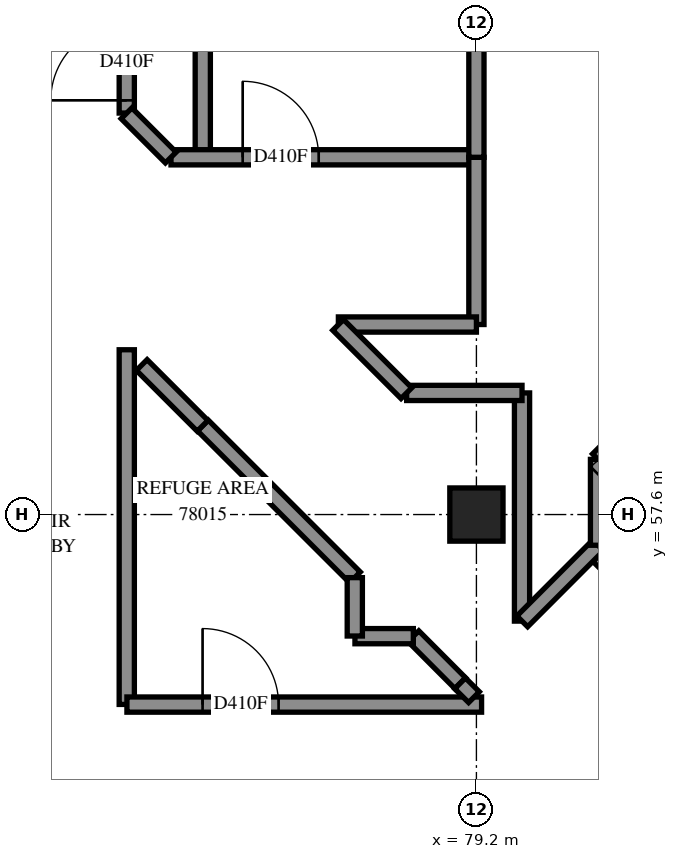
"""IFC4 building model, lengths in metres.
Left out: names, types, materials, properties, quantities, classifications, styles, units other than length and angle.
Written with IfcOpenShell. Run it as: python <this file> out.ifc"""

import sys

from ifc_helpers import new_model, si_unit, direction, frame, frame_2d, origin, origin_2d, place, context, subcontext, project, spatial, rectangle, extrude, element, fill, save


model = new_model("IFC4")
c1 = context("Model", 3, precision=1e-05, world=origin(), true_north=direction((0.0, 1.0)))
c2 = subcontext(c1, "Body", "Model", "MODEL_VIEW")
j1 = project(units=[si_unit("LENGTHUNIT", "METRE"), si_unit("PLANEANGLEUNIT", "RADIAN")], contexts=[c1])
p1 = place(None, origin())
s1 = spatial("IfcSite", under=j1, at=p1, CompositionType="ELEMENT")
p2 = place(p1, origin())
s2 = spatial("IfcBuilding", under=s1, at=p2, CompositionType="ELEMENT")
p3 = place(p2, frame((0.0, 0.0, 284.6)))
s3 = spatial("IfcBuildingStorey", under=s2, at=p3, CompositionType="ELEMENT", Elevation=284.6)
p4 = place(p3, frame((79.2, 57.6, 0.0), z_axis=(0.0, 0.0, 1.0), x_axis=(1.0, 0.0, 0.0)))
e1 = element("IfcColumn", 1, at=p4, inside=s3, PredefinedType="COLUMN", context=c2, shape_type="SweptSolid", body=[
    extrude(rectangle(XDim=0.7, YDim=0.7, at=origin_2d()), origin(), (0.0, 0.0, 1.0), 5.7),
])
p5 = place(p3, frame((76.513, 49.231, -0.3), z_axis=(0.0, 0.0, 1.0), x_axis=(0.7071067812, 0.7071067812, 0.0)))
e2 = element("IfcWall", 2, at=p5, inside=s3, PredefinedType="SHEAR", context=c2, shape_type="SweptSolid", body=[
    extrude(rectangle(XDim=14.4, YDim=0.4, at=frame_2d((7.2, 0.0))), origin(), (0.0, 0.0, 1.0), 5.3),
])
p6 = place(p5, frame((4.55, 0.0, 0.3)))
e3 = element("IfcOpeningElement", 3, at=p6, cuts=e2, PredefinedType="OPENING", context=c2, shape_type="SweptSolid", body=[
    extrude(rectangle(XDim=1.1, YDim=2.1, at=frame_2d((0.55, 1.05))), frame((0.0, 0.21, 0.0), z_axis=(0.0, -1.0, 0.0), x_axis=(1.0, 0.0, 0.0)), (0.0, 0.0, 1.0), 0.42),
])
p7 = place(p5, frame((11.35, 0.0, 0.3)))
e4 = element("IfcOpeningElement", 4, at=p7, cuts=e2, PredefinedType="OPENING", context=c2, shape_type="SweptSolid", body=[
    extrude(rectangle(XDim=1.1, YDim=2.1, at=frame_2d((0.55, 1.05))), frame((0.0, 0.21, 0.0), z_axis=(0.0, -1.0, 0.0), x_axis=(1.0, 0.0, 0.0)), (0.0, 0.0, 1.0), 0.42),
])
p8 = place(p3, frame((75.6, 62.3, 0.0), z_axis=(0.0, 0.0, 1.0), x_axis=(0.0, 1.0, 0.0)))
e5 = element("IfcWall", 5, at=p8, inside=s3, PredefinedType="PARTITIONING", context=c2, shape_type="SweptSolid", body=[
    extrude(rectangle(XDim=10.7, YDim=0.2, at=frame_2d((5.35, 0.0))), origin(), (0.0, 0.0, 1.0), 5.7),
])
p9 = place(p3, frame((80.799, 58.327, 0.0), z_axis=(0.0, 0.0, 1.0), x_axis=(0.7071067812, 0.7071067812, 0.0)))
e6 = element("IfcWall", 6, at=p9, inside=s3, PredefinedType="PARTITIONING", context=c2, shape_type="SweptSolid", body=[
    extrude(rectangle(XDim=9.608, YDim=0.2, at=frame_2d((4.804, 0.0))), origin(), (0.0, 0.0, 1.0), 5.7),
])
p10 = place(p3, frame((80.804, 56.912, 0.0), z_axis=(0.0, 0.0, 1.0), x_axis=(0.7069896038, 0.7072239391, 0.0)))
e7 = element("IfcWall", 7, at=p10, inside=s3, PredefinedType="PARTITIONING", context=c2, shape_type="SweptSolid", body=[
    extrude(rectangle(XDim=8.535, YDim=0.2, at=frame_2d((4.267, 0.0))), origin(), (0.0, 0.0, 1.0), 5.7),
])
p11 = place(p10, frame((0.859, 0.0, 0.0)))
e8 = element("IfcOpeningElement", 8, at=p11, cuts=e7, PredefinedType="OPENING", context=c2, shape_type="SweptSolid", body=[
    extrude(rectangle(XDim=1.0, YDim=2.1, at=frame_2d((0.5, 1.05))), frame((0.0, 0.11, 0.0), z_axis=(0.0, -1.0, 0.0), x_axis=(1.0, 0.0, 0.0)), (0.0, 0.0, 1.0), 0.22),
])
p12 = place(p3, frame((74.6, 55.102, 0.0), z_axis=(0.0, 0.0, 1.0), x_axis=(0.0, 1.0, 0.0)))
e9 = element("IfcWall", 9, at=p12, inside=s3, PredefinedType="PARTITIONING", context=c2, shape_type="SweptSolid", body=[
    extrude(rectangle(XDim=4.666, YDim=0.2, at=frame_2d((2.333, 0.0))), origin(), (0.0, 0.0, 1.0), 5.7),
])
p13 = place(p3, frame((74.602, 55.1, 0.0), z_axis=(0.0, 0.0, 1.0), x_axis=(1.0, 0.0, 0.0)))
e10 = element("IfcWall", 10, at=p13, inside=s3, PredefinedType="PARTITIONING", context=c2, shape_type="SweptSolid", body=[
    extrude(rectangle(XDim=4.666, YDim=0.2, at=frame_2d((2.333, 0.0))), origin(), (0.0, 0.0, 1.0), 5.7),
])
p14 = place(p13, frame((0.995, 0.0, 0.0)))
e11 = element("IfcOpeningElement", 11, at=p14, cuts=e10, PredefinedType="OPENING", context=c2, shape_type="SweptSolid", body=[
    extrude(rectangle(XDim=1.0, YDim=2.1, at=frame_2d((0.5, 1.05))), frame((0.0, 0.11, 0.0), z_axis=(0.0, -1.0, 0.0), x_axis=(1.0, 0.0, 0.0)), (0.0, 0.0, 1.0), 0.22),
])
p15 = place(p3, frame((74.6, 62.882, 0.0), z_axis=(0.0, 0.0, 1.0), x_axis=(0.0, 1.0, 0.0)))
e12 = element("IfcWall", 12, at=p15, inside=s3, PredefinedType="PARTITIONING", context=c2, shape_type="SweptSolid", body=[
    extrude(rectangle(XDim=4.518, YDim=0.2, at=frame_2d((2.259, 0.0))), origin(), (0.0, 0.0, 1.0), 5.7),
])
p16 = place(p15, frame((0.167, 0.0, 0.0)))
e13 = element("IfcOpeningElement", 13, at=p16, cuts=e12, PredefinedType="OPENING", context=c2, shape_type="SweptSolid", body=[
    extrude(rectangle(XDim=1.0, YDim=2.1, at=frame_2d((0.5, 1.05))), frame((0.0, 0.11, 0.0), z_axis=(0.0, -1.0, 0.0), x_axis=(1.0, 0.0, 0.0)), (0.0, 0.0, 1.0), 0.22),
])
p17 = place(p3, frame((75.182, 62.3, 0.0), z_axis=(0.0, 0.0, 1.0), x_axis=(1.0, 0.0, 0.0)))
e14 = element("IfcWall", 14, at=p17, inside=s3, PredefinedType="PARTITIONING", context=c2, shape_type="SweptSolid", body=[
    extrude(rectangle(XDim=4.018, YDim=0.2, at=frame_2d((2.009, 0.0))), origin(), (0.0, 0.0, 1.0), 5.7),
])
p18 = place(p17, frame((0.943, 0.0, 0.0)))
e15 = element("IfcOpeningElement", 15, at=p18, cuts=e14, PredefinedType="OPENING", context=c2, shape_type="SweptSolid", body=[
    extrude(rectangle(XDim=1.0, YDim=2.1, at=frame_2d((0.5, 1.05))), frame((0.0, 0.11, 0.0), z_axis=(0.0, -1.0, 0.0), x_axis=(1.0, 0.0, 0.0)), (0.0, 0.0, 1.0), 0.22),
])
p19 = place(p3, frame((79.8, 56.198, 0.0), z_axis=(0.0, 0.0, 1.0), x_axis=(0.0, 1.0, 0.0)))
e16 = element("IfcWall", 16, at=p19, inside=s3, PredefinedType="PARTITIONING", context=c2, shape_type="SweptSolid", body=[
    extrude(rectangle(XDim=3.002, YDim=0.2, at=frame_2d((1.501, 0.0))), origin(), (0.0, 0.0, 1.0), 5.7),
])
p20 = place(p3, frame((75.601, 58.771, 0.0), z_axis=(0.0, 0.0, 1.0), x_axis=(0.7074604229, -0.7067529625, 0.0)))
e17 = element("IfcWall", 17, at=p20, inside=s3, PredefinedType="PARTITIONING", context=c2, shape_type="SweptSolid", body=[
    extrude(rectangle(XDim=2.827, YDim=0.2, at=frame_2d((1.413, 0.0))), origin(), (0.0, 0.0, 1.0), 5.7),
])
p21 = place(p3, frame((79.2, 60.1, 0.0), z_axis=(0.0, 0.0, 1.0), x_axis=(0.0, 1.0, 0.0)))
e18 = element("IfcWall", 18, at=p21, inside=s3, PredefinedType="PARTITIONING", context=c2, shape_type="SweptSolid", body=[
    extrude(rectangle(XDim=2.2, YDim=0.2, at=frame_2d((1.1, 0.0))), origin(), (0.0, 0.0, 1.0), 5.7),
])
p22 = place(p3, frame((79.2, 62.3, 0.0), z_axis=(0.0, 0.0, 1.0), x_axis=(0.0, 1.0, 0.0)))
e19 = element("IfcWall", 19, at=p22, inside=s3, PredefinedType="PARTITIONING", context=c2, shape_type="SweptSolid", body=[
    extrude(rectangle(XDim=2.15, YDim=0.2, at=frame_2d((1.075, 0.0))), origin(), (0.0, 0.0, 1.0), 5.7),
])
p23 = place(p3, frame((77.384, 60.1, 0.0), z_axis=(0.0, 0.0, 1.0), x_axis=(1.0, 0.0, 0.0)))
e20 = element("IfcWall", 20, at=p23, inside=s3, PredefinedType="PARTITIONING", context=c2, shape_type="SweptSolid", body=[
    extrude(rectangle(XDim=1.816, YDim=0.2, at=frame_2d((0.908, 0.0))), origin(), (0.0, 0.0, 1.0), 5.7),
])
p24 = place(p3, frame((78.282, 59.2, 0.0), z_axis=(0.0, 0.0, 1.0), x_axis=(1.0, 0.0, 0.0)))
e21 = element("IfcWall", 21, at=p24, inside=s3, PredefinedType="PARTITIONING", context=c2, shape_type="SweptSolid", body=[
    extrude(rectangle(XDim=1.518, YDim=0.2, at=frame_2d((0.759, 0.0))), origin(), (0.0, 0.0, 1.0), 5.7),
])
p25 = place(p3, frame((79.803, 56.195, 0.0), z_axis=(0.0, 0.0, 1.0), x_axis=(0.7063986127, 0.7078142412, 0.0)))
e22 = element("IfcWall", 22, at=p25, inside=s3, PredefinedType="PARTITIONING", context=c2, shape_type="SweptSolid", body=[
    extrude(rectangle(XDim=1.413, YDim=0.2, at=frame_2d((0.706, 0.0))), origin(), (0.0, 0.0, 1.0), 5.7),
])
p26 = place(p3, frame((77.381, 60.095, 0.0), z_axis=(0.0, 0.0, 1.0), x_axis=(0.7071067812, -0.7071067812, 0.0)))
e23 = element("IfcWall", 23, at=p26, inside=s3, PredefinedType="PARTITIONING", context=c2, shape_type="SweptSolid", body=[
    extrude(rectangle(XDim=1.27, YDim=0.2, at=frame_2d((0.635, 0.0))), origin(), (0.0, 0.0, 1.0), 5.7),
])
p27 = place(p3, frame((74.797, 59.567, 0.0), z_axis=(0.0, 0.0, 1.0), x_axis=(0.7071067812, -0.7071067812, 0.0)))
e24 = element("IfcWall", 24, at=p27, inside=s3, PredefinedType="PARTITIONING", context=c2, shape_type="SweptSolid", body=[
    extrude(rectangle(XDim=1.131, YDim=0.2, at=frame_2d((0.566, 0.0))), origin(), (0.0, 0.0, 1.0), 5.7),
])
p28 = place(p3, frame((80.8, 57.196, 0.0), z_axis=(0.0, 0.0, 1.0), x_axis=(0.0, 1.0, 0.0)))
e25 = element("IfcWall", 25, at=p28, inside=s3, PredefinedType="PARTITIONING", context=c2, shape_type="SweptSolid", body=[
    extrude(rectangle(XDim=1.13, YDim=0.2, at=frame_2d((0.565, 0.0))), origin(), (0.0, 0.0, 1.0), 5.7),
])
p29 = place(p3, frame((78.371, 55.999, 0.0), z_axis=(0.0, 0.0, 1.0), x_axis=(0.7059598138, -0.7082518911, 0.0)))
e26 = element("IfcWall", 26, at=p29, inside=s3, PredefinedType="PARTITIONING", context=c2, shape_type="SweptSolid", body=[
    extrude(rectangle(XDim=0.873, YDim=0.2, at=frame_2d((0.436, 0.0))), origin(), (0.0, 0.0, 1.0), 5.7),
])
p30 = place(p3, frame((74.597, 62.879, 0.0), z_axis=(0.0, 0.0, 1.0), x_axis=(0.7071067812, -0.7071067812, 0.0)))
e27 = element("IfcWall", 27, at=p30, inside=s3, PredefinedType="PARTITIONING", context=c2, shape_type="SweptSolid", body=[
    extrude(rectangle(XDim=0.823, YDim=0.2, at=frame_2d((0.412, 0.0))), origin(), (0.0, 0.0, 1.0), 5.7),
])
for number, where, z_axis, x_axis in (
    (28, (77.602, 56.0, 0.0), (0.0, 0.0, 1.0), (1.0, 0.0, 0.0)),
    (29, (77.6, 56.002, 0.0), (0.0, 0.0, 1.0), (0.0, 1.0, 0.0)),
):
    element("IfcWall", number, at=place(p3, frame(where, z_axis=z_axis, x_axis=x_axis)), inside=s3, PredefinedType="PARTITIONING", context=c2, shape_type="SweptSolid", body=[
        extrude(rectangle(XDim=0.768, YDim=0.2, at=frame_2d((0.384, 0.0))), origin(), (0.0, 0.0, 1.0), 5.7),
    ])
p31 = place(p3, frame((78.985, 55.379, 0.0), z_axis=(0.0, 0.0, 1.0), x_axis=(0.7096269458, -0.7045776024, 0.0)))
e30 = element("IfcWall", 30, at=p31, inside=s3, PredefinedType="PARTITIONING", context=c2, shape_type="SweptSolid", body=[
    extrude(rectangle(XDim=0.258, YDim=0.2, at=frame_2d((0.129, 0.0))), origin(), (0.0, 0.0, 1.0), 5.7),
])
p32 = place(p14, origin())
e31 = element("IfcDoor", 31, at=p32, inside=s3, OperationType="SINGLE_SWING_LEFT", PredefinedType="DOOR", context=c2, shape_type="SweptSolid", body=[
    extrude(rectangle(XDim=1.0, YDim=2.1, at=frame_2d((0.5, 1.05))), frame((0.0, 0.025, 0.0), z_axis=(0.0, -1.0, 0.0), x_axis=(1.0, 0.0, 0.0)), (0.0, 0.0, 1.0), 0.05),
])
fill(e11, e31)
p33 = place(p16, origin())
e32 = element("IfcDoor", 32, at=p33, inside=s3, OperationType="SINGLE_SWING_RIGHT", PredefinedType="DOOR", context=c2, shape_type="SweptSolid", body=[
    extrude(rectangle(XDim=1.0, YDim=2.1, at=frame_2d((0.5, 1.05))), frame((0.0, 0.025, 0.0), z_axis=(0.0, -1.0, 0.0), x_axis=(1.0, 0.0, 0.0)), (0.0, 0.0, 1.0), 0.05),
])
fill(e13, e32)
p34 = place(p18, origin())
e33 = element("IfcDoor", 33, at=p34, inside=s3, OperationType="SINGLE_SWING_LEFT", PredefinedType="DOOR", context=c2, shape_type="SweptSolid", body=[
    extrude(rectangle(XDim=1.0, YDim=2.1, at=frame_2d((0.5, 1.05))), frame((0.0, 0.025, 0.0), z_axis=(0.0, -1.0, 0.0), x_axis=(1.0, 0.0, 0.0)), (0.0, 0.0, 1.0), 0.05),
])
fill(e15, e33)
save(model, sys.argv[1])
